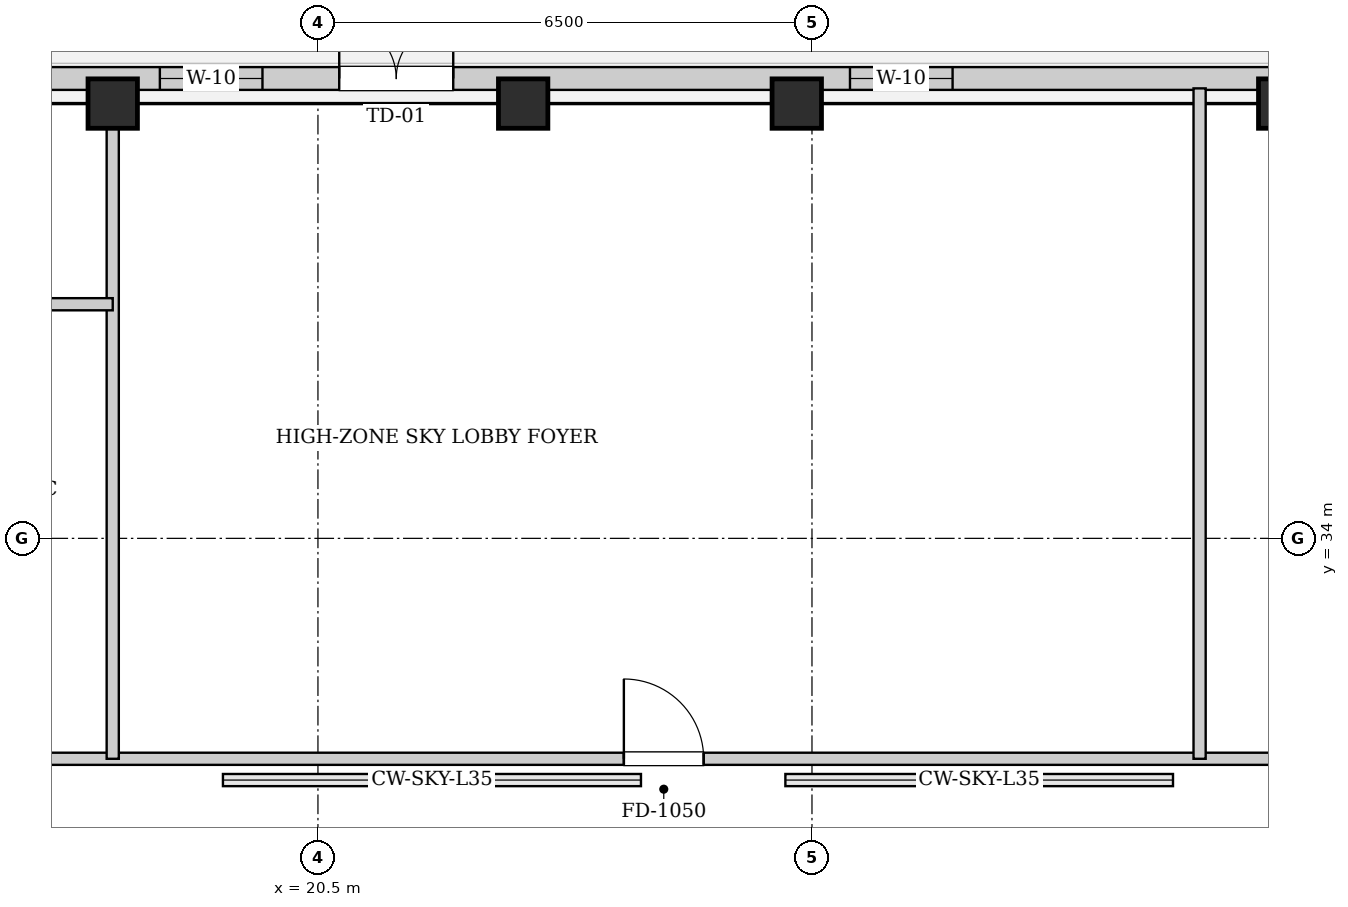
"""IFC4 building model, lengths in metres.
Left out: names, types, materials, properties, quantities, classifications, styles, units other than length and angle.
Written with IfcOpenShell. Run it as: python <this file> out.ifc"""

import sys

from ifc_helpers import new_model, si_unit, direction, frame, frame_2d, origin, origin_2d, place, context, subcontext, project, spatial, rectangle, extrude, element, fill, save


model = new_model("IFC4")
c1 = context("Model", 3, precision=1e-05, world=origin(), true_north=direction((0.0, 1.0)))
c2 = subcontext(c1, "Body", "Model", "MODEL_VIEW")
j1 = project(units=[si_unit("LENGTHUNIT", "METRE"), si_unit("PLANEANGLEUNIT", "RADIAN")], contexts=[c1])
p1 = place(None, origin())
s1 = spatial("IfcSite", under=j1, at=p1, CompositionType="ELEMENT")
p2 = place(p1, origin())
s2 = spatial("IfcBuilding", under=s1, at=p2, CompositionType="ELEMENT")
p3 = place(p2, frame((0.0, 0.0, 174.4)))
s3 = spatial("IfcBuildingStorey", under=s2, at=p3, CompositionType="ELEMENT", Elevation=174.4)
for number, where, z_axis, x_axis in (
    (1, (17.8, 39.72, 0.0), (0.0, 0.0, 1.0), (1.0, 0.0, 0.0)),
    (2, (23.2, 39.72, 0.0), (0.0, 0.0, 1.0), (1.0, 0.0, 0.0)),
    (3, (26.8, 39.72, 0.0), (0.0, 0.0, 1.0), (1.0, 0.0, 0.0)),
    (4, (33.2, 39.72, 0.0), (0.0, 0.0, 1.0), (1.0, 0.0, 0.0)),
):
    element("IfcColumn", number, at=place(p3, frame(where, z_axis=z_axis, x_axis=x_axis)), inside=s3, PredefinedType="COLUMN", context=c2, shape_type="SweptSolid", body=[
        extrude(rectangle(XDim=0.65, YDim=0.65, at=origin_2d()), origin(), (0.0, 0.0, 1.0), 3.3),
    ])
p4 = place(p3, frame((13.1, 40.05, 0.0), z_axis=(0.0, 0.0, 1.0), x_axis=(1.0, 0.0, 0.0)))
e5 = element("IfcWall", 5, at=p4, inside=s3, PredefinedType="SOLIDWALL", context=c2, shape_type="SweptSolid", body=[
    extrude(rectangle(XDim=24.7, YDim=0.3, at=frame_2d((12.35, 0.0))), origin(), (0.0, 0.0, 1.0), 3.04),
])
p5 = place(p4, frame((7.68, 0.0, 0.0)))
e6 = element("IfcOpeningElement", 6, at=p5, cuts=e5, PredefinedType="OPENING", context=c2, shape_type="SweptSolid", body=[
    extrude(rectangle(XDim=1.5, YDim=1.982, at=frame_2d((0.75, 0.991))), frame((0.0, 0.16, 0.0), z_axis=(0.0, -1.0, 0.0), x_axis=(1.0, 0.0, 0.0)), (0.0, 0.0, 1.0), 0.32),
])
p6 = place(p4, frame((14.4, 0.0, 0.55)))
e7 = element("IfcOpeningElement", 7, at=p6, cuts=e5, PredefinedType="OPENING", context=c2, shape_type="SweptSolid", body=[
    extrude(rectangle(XDim=1.35, YDim=1.2, at=frame_2d((0.675, 0.6))), frame((0.0, 0.16, 0.0), z_axis=(0.0, -1.0, 0.0), x_axis=(1.0, 0.0, 0.0)), (0.0, 0.0, 1.0), 0.32),
])
p7 = place(p4, frame((5.32, 0.0, 0.55)))
e8 = element("IfcOpeningElement", 8, at=p7, cuts=e5, PredefinedType="OPENING", context=c2, shape_type="SweptSolid", body=[
    extrude(rectangle(XDim=1.35, YDim=1.2, at=frame_2d((0.675, 0.6))), frame((0.0, 0.16, 0.0), z_axis=(0.0, -1.0, 0.0), x_axis=(1.0, 0.0, 0.0)), (0.0, 0.0, 1.0), 0.32),
])
p8 = place(p3, frame((13.8, 31.1, 0.0), z_axis=(0.0, 0.0, 1.0), x_axis=(1.0, 0.0, 0.0)))
e9 = element("IfcWall", 9, at=p8, inside=s3, PredefinedType="PARTITIONING", context=c2, shape_type="SweptSolid", body=[
    extrude(rectangle(XDim=23.3, YDim=0.16, at=frame_2d((11.65, 0.0))), origin(), (0.0, 0.0, 1.0), 3.04),
])
p9 = place(p8, frame((1.85, 0.0, 0.0)))
e10 = element("IfcOpeningElement", 10, at=p9, cuts=e9, PredefinedType="OPENING", context=c2, shape_type="SweptSolid", body=[
    extrude(rectangle(XDim=0.9, YDim=2.05, at=frame_2d((0.45, 1.025))), frame((0.0, 0.09, 0.0), z_axis=(0.0, -1.0, 0.0), x_axis=(1.0, 0.0, 0.0)), (0.0, 0.0, 1.0), 0.18),
])
p10 = place(p8, frame((10.725, 0.0, 0.0)))
e11 = element("IfcOpeningElement", 11, at=p10, cuts=e9, PredefinedType="OPENING", context=c2, shape_type="SweptSolid", body=[
    extrude(rectangle(XDim=1.05, YDim=2.05, at=frame_2d((0.525, 1.025))), frame((0.0, 0.09, 0.0), z_axis=(0.0, -1.0, 0.0), x_axis=(1.0, 0.0, 0.0)), (0.0, 0.0, 1.0), 0.18),
])
p11 = place(p8, frame((20.55, 0.0, 0.0)))
e12 = element("IfcOpeningElement", 12, at=p11, cuts=e9, PredefinedType="OPENING", context=c2, shape_type="SweptSolid", body=[
    extrude(rectangle(XDim=0.9, YDim=2.05, at=frame_2d((0.45, 1.025))), frame((0.0, 0.09, 0.0), z_axis=(0.0, -1.0, 0.0), x_axis=(1.0, 0.0, 0.0)), (0.0, 0.0, 1.0), 0.18),
])
p12 = place(p3, frame((17.8, 31.1, 0.0), z_axis=(0.0, 0.0, 1.0), x_axis=(0.0, 1.0, 0.0)))
e13 = element("IfcWall", 13, at=p12, inside=s3, PredefinedType="PARTITIONING", context=c2, shape_type="SweptSolid", body=[
    extrude(rectangle(XDim=8.8, YDim=0.16, at=frame_2d((4.4, 0.0))), origin(), (0.0, 0.0, 1.0), 2.556),
])
p13 = place(p3, frame((13.7, 37.08, 0.0), z_axis=(0.0, 0.0, 1.0), x_axis=(1.0, 0.0, 0.0)))
e14 = element("IfcWall", 14, at=p13, inside=s3, PredefinedType="PARTITIONING", context=c2, shape_type="SweptSolid", body=[
    extrude(rectangle(XDim=4.1, YDim=0.16, at=frame_2d((2.05, 0.0))), origin(), (0.0, 0.0, 1.0), 3.04),
])
p14 = place(p3, frame((32.1, 31.1, 0.0), z_axis=(0.0, 0.0, 1.0), x_axis=(0.0, 1.0, 0.0)))
e15 = element("IfcWall", 15, at=p14, inside=s3, PredefinedType="PARTITIONING", context=c2, shape_type="SweptSolid", body=[
    extrude(rectangle(XDim=8.82, YDim=0.16, at=frame_2d((4.41, 0.0))), origin(), (0.0, 0.0, 1.0), 3.04),
])
p15 = place(p10, origin())
e16 = element("IfcDoor", 16, at=p15, inside=s3, OperationType="SINGLE_SWING_LEFT", PredefinedType="DOOR", context=c2, shape_type="SweptSolid", body=[
    extrude(rectangle(XDim=1.05, YDim=2.05, at=frame_2d((0.525, 1.025))), frame((0.0, 0.025, 0.0), z_axis=(0.0, -1.0, 0.0), x_axis=(1.0, 0.0, 0.0)), (0.0, 0.0, 1.0), 0.05),
])
fill(e11, e16)
p16 = place(p5, origin())
e17 = element("IfcDoor", 17, at=p16, inside=s3, OperationType="DOUBLE_SWING_LEFT", PredefinedType="DOOR", context=c2, shape_type="SweptSolid", body=[
    extrude(rectangle(XDim=1.5, YDim=1.982, at=frame_2d((0.75, 0.991))), frame((0.0, 0.025, 0.0), z_axis=(0.0, -1.0, 0.0), x_axis=(1.0, 0.0, 0.0)), (0.0, 0.0, 1.0), 0.05),
])
fill(e6, e17)
p17 = place(p6, origin())
e18 = element("IfcWindow", 18, at=p17, inside=s3, PartitioningType="SINGLE_PANEL", PredefinedType="WINDOW", context=c2, shape_type="SweptSolid", body=[
    extrude(rectangle(XDim=1.35, YDim=1.2, at=frame_2d((0.675, 0.6))), frame((0.0, 0.03, 0.0), z_axis=(0.0, -1.0, 0.0), x_axis=(1.0, 0.0, 0.0)), (0.0, 0.0, 1.0), 0.06),
])
fill(e7, e18)
p18 = place(p7, origin())
e19 = element("IfcWindow", 19, at=p18, inside=s3, PartitioningType="SINGLE_PANEL", PredefinedType="WINDOW", context=c2, shape_type="SweptSolid", body=[
    extrude(rectangle(XDim=1.35, YDim=1.2, at=frame_2d((0.675, 0.6))), frame((0.0, 0.03, 0.0), z_axis=(0.0, -1.0, 0.0), x_axis=(1.0, 0.0, 0.0)), (0.0, 0.0, 1.0), 0.06),
])
fill(e8, e19)
save(model, sys.argv[1])
